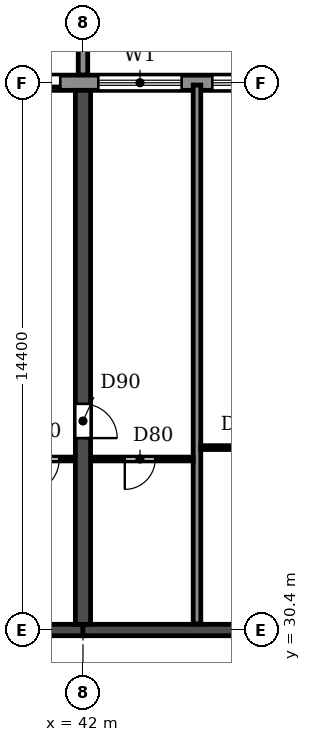
"""IFC4 building model, lengths in metres.
Left out: names, types, materials, properties, quantities, classifications, styles, units other than length and angle.
Written with IfcOpenShell. Run it as: python <this file> out.ifc"""

import sys

from ifc_helpers import new_model, si_unit, direction, frame, frame_2d, origin, place, context, subcontext, project, spatial, polyline, rectangle, outline, extrude, source, transform, mapped, element, fill, save


model = new_model("IFC4")
c1 = context("Model", 3, precision=1e-05, world=origin(), true_north=direction((0.0, 1.0)))
c2 = subcontext(c1, "Body", "Model", "MODEL_VIEW")
j1 = project(units=[si_unit("LENGTHUNIT", "METRE"), si_unit("PLANEANGLEUNIT", "RADIAN")], contexts=[c1])
p1 = place(None, origin())
s1 = spatial("IfcSite", under=j1, at=p1, CompositionType="ELEMENT")
p2 = place(p1, origin())
s2 = spatial("IfcBuilding", under=s1, at=p2, CompositionType="ELEMENT")
p3 = place(p2, frame((0.0, 0.0, 33.3)))
s3 = spatial("IfcBuildingStorey", under=s2, at=p3, CompositionType="ELEMENT", Elevation=33.3)
p4 = place(p3, frame((42.0, 30.55, 0.0), z_axis=(0.0, 0.0, 1.0), x_axis=(0.0, 1.0, 0.0)))
e1 = element("IfcWall", 1, at=p4, inside=s3, PredefinedType="SHEAR", context=c2, shape_type="SweptSolid", body=[
    extrude(rectangle(XDim=14.05, YDim=0.4, at=frame_2d((7.025, 0.0))), origin(), (0.0, 0.0, 1.0), 3.05),
])
p5 = place(p4, frame((4.9, 0.0, 0.0)))
e2 = element("IfcOpeningElement", 2, at=p5, cuts=e1, PredefinedType="OPENING", context=c2, shape_type="SweptSolid", body=[
    extrude(rectangle(XDim=0.9, YDim=2.1, at=frame_2d((0.45, 1.05))), frame((0.0, 0.21, 0.0), z_axis=(0.0, -1.0, 0.0), x_axis=(1.0, 0.0, 0.0)), (0.0, 0.0, 1.0), 0.42),
])
p6 = place(p3, frame((36.0, 30.4, 0.0), z_axis=(0.0, 0.0, 1.0), x_axis=(1.0, 0.0, 0.0)))
e3 = element("IfcWall", 3, at=p6, inside=s3, PredefinedType="SHEAR", context=c2, shape_type="SweptSolid", body=[
    extrude(rectangle(XDim=6.0, YDim=0.3, at=frame_2d((3.0, 0.0))), origin(), (0.0, 0.0, 1.0), 2.45),
])
p7 = place(p6, frame((2.45, 0.0, 0.0)))
e4 = element("IfcOpeningElement", 4, at=p7, cuts=e3, PredefinedType="OPENING", context=c2, shape_type="SweptSolid", body=[
    extrude(rectangle(XDim=1.0, YDim=2.1, at=frame_2d((0.5, 1.05))), frame((0.0, 0.16, 0.0), z_axis=(0.0, -1.0, 0.0), x_axis=(1.0, 0.0, 0.0)), (0.0, 0.0, 1.0), 0.32),
])
p8 = place(p3, frame((42.0, 30.4, 0.0), z_axis=(0.0, 0.0, 1.0), x_axis=(1.0, 0.0, 0.0)))
e5 = element("IfcWall", 5, at=p8, inside=s3, PredefinedType="SHEAR", context=c2, shape_type="SweptSolid", body=[
    extrude(rectangle(XDim=6.0, YDim=0.3, at=frame_2d((3.0, 0.0))), origin(), (0.0, 0.0, 1.0), 2.45),
])
p9 = place(p3, frame((97.317, 44.8, 0.0), z_axis=(0.0, 0.0, 1.0), x_axis=(-1.0, 0.0, 0.0)))
e6 = element("IfcWall", 6, at=p9, inside=s3, PredefinedType="STANDARD", context=c2, shape_type="SweptSolid", body=[
    extrude(rectangle(XDim=92.634, YDim=0.4, at=frame_2d((46.317, 0.0))), origin(), (0.0, 0.0, 1.0), 3.05),
])
p10 = place(p9, frame((88.717, 0.0, 0.9)))
e7 = element("IfcOpeningElement", 7, at=p10, cuts=e6, PredefinedType="OPENING", context=c2, shape_type="SweptSolid", body=[
    extrude(rectangle(XDim=2.2, YDim=1.5, at=frame_2d((1.1, 0.75))), frame((0.0, 0.21, 0.0), z_axis=(0.0, -1.0, 0.0), x_axis=(1.0, 0.0, 0.0)), (0.0, 0.0, 1.0), 0.42),
])
p11 = place(p9, frame((85.917, 0.0, 0.0)))
e8 = element("IfcOpeningElement", 8, at=p11, cuts=e6, PredefinedType="OPENING", context=c2, shape_type="SweptSolid", body=[
    extrude(rectangle(XDim=1.8, YDim=2.4, at=frame_2d((0.9, 1.2))), frame((0.0, 0.21, 0.0), z_axis=(0.0, -1.0, 0.0), x_axis=(1.0, 0.0, 0.0)), (0.0, 0.0, 1.0), 0.42),
])
p12 = place(p9, frame((82.717, 0.0, 0.9)))
e9 = element("IfcOpeningElement", 9, at=p12, cuts=e6, PredefinedType="OPENING", context=c2, shape_type="SweptSolid", body=[
    extrude(rectangle(XDim=2.2, YDim=1.5, at=frame_2d((1.1, 0.75))), frame((0.0, 0.21, 0.0), z_axis=(0.0, -1.0, 0.0), x_axis=(1.0, 0.0, 0.0)), (0.0, 0.0, 1.0), 0.42),
])
p13 = place(p9, frame((79.917, 0.0, 0.0)))
e10 = element("IfcOpeningElement", 10, at=p13, cuts=e6, PredefinedType="OPENING", context=c2, shape_type="SweptSolid", body=[
    extrude(rectangle(XDim=1.8, YDim=2.4, at=frame_2d((0.9, 1.2))), frame((0.0, 0.21, 0.0), z_axis=(0.0, -1.0, 0.0), x_axis=(1.0, 0.0, 0.0)), (0.0, 0.0, 1.0), 0.42),
])
p14 = place(p9, frame((76.717, 0.0, 0.9)))
e11 = element("IfcOpeningElement", 11, at=p14, cuts=e6, PredefinedType="OPENING", context=c2, shape_type="SweptSolid", body=[
    extrude(rectangle(XDim=2.2, YDim=1.5, at=frame_2d((1.1, 0.75))), frame((0.0, 0.21, 0.0), z_axis=(0.0, -1.0, 0.0), x_axis=(1.0, 0.0, 0.0)), (0.0, 0.0, 1.0), 0.42),
])
p15 = place(p9, frame((73.717, 0.0, 0.9)))
e12 = element("IfcOpeningElement", 12, at=p15, cuts=e6, PredefinedType="OPENING", context=c2, shape_type="SweptSolid", body=[
    extrude(rectangle(XDim=2.2, YDim=1.5, at=frame_2d((1.1, 0.75))), frame((0.0, 0.21, 0.0), z_axis=(0.0, -1.0, 0.0), x_axis=(1.0, 0.0, 0.0)), (0.0, 0.0, 1.0), 0.42),
])
p16 = place(p9, frame((70.717, 0.0, 0.9)))
e13 = element("IfcOpeningElement", 13, at=p16, cuts=e6, PredefinedType="OPENING", context=c2, shape_type="SweptSolid", body=[
    extrude(rectangle(XDim=2.2, YDim=1.5, at=frame_2d((1.1, 0.75))), frame((0.0, 0.21, 0.0), z_axis=(0.0, -1.0, 0.0), x_axis=(1.0, 0.0, 0.0)), (0.0, 0.0, 1.0), 0.42),
])
p17 = place(p9, frame((67.917, 0.0, 0.0)))
e14 = element("IfcOpeningElement", 14, at=p17, cuts=e6, PredefinedType="OPENING", context=c2, shape_type="SweptSolid", body=[
    extrude(rectangle(XDim=1.8, YDim=2.4, at=frame_2d((0.9, 1.2))), frame((0.0, 0.21, 0.0), z_axis=(0.0, -1.0, 0.0), x_axis=(1.0, 0.0, 0.0)), (0.0, 0.0, 1.0), 0.42),
])
p18 = place(p9, frame((64.717, 0.0, 0.9)))
e15 = element("IfcOpeningElement", 15, at=p18, cuts=e6, PredefinedType="OPENING", context=c2, shape_type="SweptSolid", body=[
    extrude(rectangle(XDim=2.2, YDim=1.5, at=frame_2d((1.1, 0.75))), frame((0.0, 0.21, 0.0), z_axis=(0.0, -1.0, 0.0), x_axis=(1.0, 0.0, 0.0)), (0.0, 0.0, 1.0), 0.42),
])
p19 = place(p9, frame((61.717, 0.0, 0.9)))
e16 = element("IfcOpeningElement", 16, at=p19, cuts=e6, PredefinedType="OPENING", context=c2, shape_type="SweptSolid", body=[
    extrude(rectangle(XDim=2.2, YDim=1.5, at=frame_2d((1.1, 0.75))), frame((0.0, 0.21, 0.0), z_axis=(0.0, -1.0, 0.0), x_axis=(1.0, 0.0, 0.0)), (0.0, 0.0, 1.0), 0.42),
])
p20 = place(p9, frame((58.717, 0.0, 0.9)))
e17 = element("IfcOpeningElement", 17, at=p20, cuts=e6, PredefinedType="OPENING", context=c2, shape_type="SweptSolid", body=[
    extrude(rectangle(XDim=2.2, YDim=1.5, at=frame_2d((1.1, 0.75))), frame((0.0, 0.21, 0.0), z_axis=(0.0, -1.0, 0.0), x_axis=(1.0, 0.0, 0.0)), (0.0, 0.0, 1.0), 0.42),
])
p21 = place(p9, frame((55.917, 0.0, 0.0)))
e18 = element("IfcOpeningElement", 18, at=p21, cuts=e6, PredefinedType="OPENING", context=c2, shape_type="SweptSolid", body=[
    extrude(rectangle(XDim=1.8, YDim=2.4, at=frame_2d((0.9, 1.2))), frame((0.0, 0.21, 0.0), z_axis=(0.0, -1.0, 0.0), x_axis=(1.0, 0.0, 0.0)), (0.0, 0.0, 1.0), 0.42),
])
p22 = place(p9, frame((52.717, 0.0, 0.9)))
e19 = element("IfcOpeningElement", 19, at=p22, cuts=e6, PredefinedType="OPENING", context=c2, shape_type="SweptSolid", body=[
    extrude(rectangle(XDim=2.2, YDim=1.5, at=frame_2d((1.1, 0.75))), frame((0.0, 0.21, 0.0), z_axis=(0.0, -1.0, 0.0), x_axis=(1.0, 0.0, 0.0)), (0.0, 0.0, 1.0), 0.42),
])
p23 = place(p9, frame((49.717, 0.0, 0.9)))
e20 = element("IfcOpeningElement", 20, at=p23, cuts=e6, PredefinedType="OPENING", context=c2, shape_type="SweptSolid", body=[
    extrude(rectangle(XDim=2.2, YDim=1.5, at=frame_2d((1.1, 0.75))), frame((0.0, 0.21, 0.0), z_axis=(0.0, -1.0, 0.0), x_axis=(1.0, 0.0, 0.0)), (0.0, 0.0, 1.0), 0.42),
])
p24 = place(p9, frame((46.717, 0.0, 0.9)))
e21 = element("IfcOpeningElement", 21, at=p24, cuts=e6, PredefinedType="OPENING", context=c2, shape_type="SweptSolid", body=[
    extrude(rectangle(XDim=2.2, YDim=1.5, at=frame_2d((1.1, 0.75))), frame((0.0, 0.21, 0.0), z_axis=(0.0, -1.0, 0.0), x_axis=(1.0, 0.0, 0.0)), (0.0, 0.0, 1.0), 0.42),
])
p25 = place(p9, frame((43.917, 0.0, 0.0)))
e22 = element("IfcOpeningElement", 22, at=p25, cuts=e6, PredefinedType="OPENING", context=c2, shape_type="SweptSolid", body=[
    extrude(rectangle(XDim=1.8, YDim=2.4, at=frame_2d((0.9, 1.2))), frame((0.0, 0.21, 0.0), z_axis=(0.0, -1.0, 0.0), x_axis=(1.0, 0.0, 0.0)), (0.0, 0.0, 1.0), 0.42),
])
p26 = place(p9, frame((40.717, 0.0, 0.9)))
e23 = element("IfcOpeningElement", 23, at=p26, cuts=e6, PredefinedType="OPENING", context=c2, shape_type="SweptSolid", body=[
    extrude(rectangle(XDim=2.2, YDim=1.5, at=frame_2d((1.1, 0.75))), frame((0.0, 0.21, 0.0), z_axis=(0.0, -1.0, 0.0), x_axis=(1.0, 0.0, 0.0)), (0.0, 0.0, 1.0), 0.42),
])
p27 = place(p9, frame((37.717, 0.0, 0.9)))
e24 = element("IfcOpeningElement", 24, at=p27, cuts=e6, PredefinedType="OPENING", context=c2, shape_type="SweptSolid", body=[
    extrude(rectangle(XDim=2.2, YDim=1.5, at=frame_2d((1.1, 0.75))), frame((0.0, 0.21, 0.0), z_axis=(0.0, -1.0, 0.0), x_axis=(1.0, 0.0, 0.0)), (0.0, 0.0, 1.0), 0.42),
])
p28 = place(p9, frame((34.717, 0.0, 0.9)))
e25 = element("IfcOpeningElement", 25, at=p28, cuts=e6, PredefinedType="OPENING", context=c2, shape_type="SweptSolid", body=[
    extrude(rectangle(XDim=2.2, YDim=1.5, at=frame_2d((1.1, 0.75))), frame((0.0, 0.21, 0.0), z_axis=(0.0, -1.0, 0.0), x_axis=(1.0, 0.0, 0.0)), (0.0, 0.0, 1.0), 0.42),
])
p29 = place(p9, frame((31.917, 0.0, 0.0)))
e26 = element("IfcOpeningElement", 26, at=p29, cuts=e6, PredefinedType="OPENING", context=c2, shape_type="SweptSolid", body=[
    extrude(rectangle(XDim=1.8, YDim=2.4, at=frame_2d((0.9, 1.2))), frame((0.0, 0.21, 0.0), z_axis=(0.0, -1.0, 0.0), x_axis=(1.0, 0.0, 0.0)), (0.0, 0.0, 1.0), 0.42),
])
p30 = place(p9, frame((28.717, 0.0, 0.9)))
e27 = element("IfcOpeningElement", 27, at=p30, cuts=e6, PredefinedType="OPENING", context=c2, shape_type="SweptSolid", body=[
    extrude(rectangle(XDim=2.2, YDim=1.5, at=frame_2d((1.1, 0.75))), frame((0.0, 0.21, 0.0), z_axis=(0.0, -1.0, 0.0), x_axis=(1.0, 0.0, 0.0)), (0.0, 0.0, 1.0), 0.42),
])
p31 = place(p9, frame((25.717, 0.0, 0.9)))
e28 = element("IfcOpeningElement", 28, at=p31, cuts=e6, PredefinedType="OPENING", context=c2, shape_type="SweptSolid", body=[
    extrude(rectangle(XDim=2.2, YDim=1.5, at=frame_2d((1.1, 0.75))), frame((0.0, 0.21, 0.0), z_axis=(0.0, -1.0, 0.0), x_axis=(1.0, 0.0, 0.0)), (0.0, 0.0, 1.0), 0.42),
])
p32 = place(p9, frame((22.917, 0.0, 0.0)))
e29 = element("IfcOpeningElement", 29, at=p32, cuts=e6, PredefinedType="OPENING", context=c2, shape_type="SweptSolid", body=[
    extrude(rectangle(XDim=1.8, YDim=2.4, at=frame_2d((0.9, 1.2))), frame((0.0, 0.21, 0.0), z_axis=(0.0, -1.0, 0.0), x_axis=(1.0, 0.0, 0.0)), (0.0, 0.0, 1.0), 0.42),
])
p33 = place(p9, frame((19.717, 0.0, 0.9)))
e30 = element("IfcOpeningElement", 30, at=p33, cuts=e6, PredefinedType="OPENING", context=c2, shape_type="SweptSolid", body=[
    extrude(rectangle(XDim=2.2, YDim=1.5, at=frame_2d((1.1, 0.75))), frame((0.0, 0.21, 0.0), z_axis=(0.0, -1.0, 0.0), x_axis=(1.0, 0.0, 0.0)), (0.0, 0.0, 1.0), 0.42),
])
p34 = place(p9, frame((16.717, 0.0, 0.9)))
e31 = element("IfcOpeningElement", 31, at=p34, cuts=e6, PredefinedType="OPENING", context=c2, shape_type="SweptSolid", body=[
    extrude(rectangle(XDim=2.2, YDim=1.5, at=frame_2d((1.1, 0.75))), frame((0.0, 0.21, 0.0), z_axis=(0.0, -1.0, 0.0), x_axis=(1.0, 0.0, 0.0)), (0.0, 0.0, 1.0), 0.42),
])
p35 = place(p9, frame((13.917, 0.0, 0.0)))
e32 = element("IfcOpeningElement", 32, at=p35, cuts=e6, PredefinedType="OPENING", context=c2, shape_type="SweptSolid", body=[
    extrude(rectangle(XDim=1.8, YDim=2.4, at=frame_2d((0.9, 1.2))), frame((0.0, 0.21, 0.0), z_axis=(0.0, -1.0, 0.0), x_axis=(1.0, 0.0, 0.0)), (0.0, 0.0, 1.0), 0.42),
])
p36 = place(p9, frame((10.717, 0.0, 0.9)))
e33 = element("IfcOpeningElement", 33, at=p36, cuts=e6, PredefinedType="OPENING", context=c2, shape_type="SweptSolid", body=[
    extrude(rectangle(XDim=2.2, YDim=1.5, at=frame_2d((1.1, 0.75))), frame((0.0, 0.21, 0.0), z_axis=(0.0, -1.0, 0.0), x_axis=(1.0, 0.0, 0.0)), (0.0, 0.0, 1.0), 0.42),
])
p37 = place(p9, frame((7.917, 0.0, 0.0)))
e34 = element("IfcOpeningElement", 34, at=p37, cuts=e6, PredefinedType="OPENING", context=c2, shape_type="SweptSolid", body=[
    extrude(rectangle(XDim=1.8, YDim=2.4, at=frame_2d((0.9, 1.2))), frame((0.0, 0.21, 0.0), z_axis=(0.0, -1.0, 0.0), x_axis=(1.0, 0.0, 0.0)), (0.0, 0.0, 1.0), 0.42),
])
p38 = place(p9, frame((4.717, 0.0, 0.9)))
e35 = element("IfcOpeningElement", 35, at=p38, cuts=e6, PredefinedType="OPENING", context=c2, shape_type="SweptSolid", body=[
    extrude(rectangle(XDim=2.2, YDim=1.5, at=frame_2d((1.1, 0.75))), frame((0.0, 0.21, 0.0), z_axis=(0.0, -1.0, 0.0), x_axis=(1.0, 0.0, 0.0)), (0.0, 0.0, 1.0), 0.42),
])
p39 = place(p9, frame((1.917, 0.0, 0.0)))
e36 = element("IfcOpeningElement", 36, at=p39, cuts=e6, PredefinedType="OPENING", context=c2, shape_type="SweptSolid", body=[
    extrude(rectangle(XDim=1.8, YDim=2.4, at=frame_2d((0.9, 1.2))), frame((0.0, 0.21, 0.0), z_axis=(0.0, -1.0, 0.0), x_axis=(1.0, 0.0, 0.0)), (0.0, 0.0, 1.0), 0.42),
])
m1 = source(origin(), c2, "Body", "SweptSolid", [
    extrude(outline(polyline([(0.0, 0.0), (0.25, 0.0), (0.25, 3.1), (0.0, 3.1), (0.0, 0.0)])), origin(), (0.0, 0.0, 1.0), 3.1),
])
p40 = place(p3, frame((41.875, 45.0, 0.0)))
e37 = element("IfcWall", 37, at=p40, inside=s3, PredefinedType="STANDARD", context=c2, shape_type="MappedRepresentation", body=[
    mapped(m1, transform((0.0, 0.0, 0.0))),
])
p41 = place(p3, frame((45.0, 30.56, 0.0), z_axis=(0.0, 0.0, 1.0), x_axis=(0.0, 1.0, 0.0)))
e38 = element("IfcWall", 38, at=p41, inside=s3, PredefinedType="PARTITIONING", context=c2, shape_type="SweptSolid", body=[
    extrude(rectangle(XDim=14.18, YDim=0.2, at=frame_2d((7.09, 0.0))), origin(), (0.0, 0.0, 1.0), 3.05),
])
p42 = place(p3, frame((39.8, 34.9, 0.0), z_axis=(0.0, 0.0, 1.0), x_axis=(1.0, 0.0, 0.0)))
e39 = element("IfcWall", 39, at=p42, inside=s3, PredefinedType="PARTITIONING", context=c2, shape_type="SweptSolid", body=[
    extrude(rectangle(XDim=1.99, YDim=0.1, at=frame_2d((0.995, 0.0))), origin(), (0.0, 0.0, 1.0), 3.05),
])
p43 = place(p42, frame((0.675, 0.0, 0.0)))
e40 = element("IfcOpeningElement", 40, at=p43, cuts=e39, PredefinedType="OPENING", context=c2, shape_type="SweptSolid", body=[
    extrude(rectangle(XDim=0.9, YDim=2.1, at=frame_2d((0.45, 1.05))), frame((0.0, 0.06, 0.0), z_axis=(0.0, -1.0, 0.0), x_axis=(1.0, 0.0, 0.0)), (0.0, 0.0, 1.0), 0.12),
])
p44 = place(p3, frame((42.21, 34.9, 0.0), z_axis=(0.0, 0.0, 1.0), x_axis=(1.0, 0.0, 0.0)))
e41 = element("IfcWall", 41, at=p44, inside=s3, PredefinedType="PARTITIONING", context=c2, shape_type="SweptSolid", body=[
    extrude(rectangle(XDim=2.69, YDim=0.1, at=frame_2d((1.345, 0.0))), origin(), (0.0, 0.0, 1.0), 3.05),
])
p45 = place(p44, frame((0.89, 0.0, 0.0)))
e42 = element("IfcOpeningElement", 42, at=p45, cuts=e41, PredefinedType="OPENING", context=c2, shape_type="SweptSolid", body=[
    extrude(rectangle(XDim=0.8, YDim=2.1, at=frame_2d((0.4, 1.05))), frame((0.0, 0.06, 0.0), z_axis=(0.0, -1.0, 0.0), x_axis=(1.0, 0.0, 0.0)), (0.0, 0.0, 1.0), 0.12),
])
p46 = place(p3, frame((45.1, 35.2, 0.0), z_axis=(0.0, 0.0, 1.0), x_axis=(1.0, 0.0, 0.0)))
e43 = element("IfcWall", 43, at=p46, inside=s3, PredefinedType="PARTITIONING", context=c2, shape_type="SweptSolid", body=[
    extrude(rectangle(XDim=2.69, YDim=0.1, at=frame_2d((1.345, 0.0))), origin(), (0.0, 0.0, 1.0), 3.05),
])
p47 = place(p46, frame((1.0, 0.0, 0.0)))
e44 = element("IfcOpeningElement", 44, at=p47, cuts=e43, PredefinedType="OPENING", context=c2, shape_type="SweptSolid", body=[
    extrude(rectangle(XDim=0.8, YDim=2.1, at=frame_2d((0.4, 1.05))), frame((0.0, 0.06, 0.0), z_axis=(0.0, -1.0, 0.0), x_axis=(1.0, 0.0, 0.0)), (0.0, 0.0, 1.0), 0.12),
])
p48 = place(p21, origin())
e45 = element("IfcDoor", 45, at=p48, inside=s3, OperationType="DOUBLE_DOOR_SLIDING", PredefinedType="DOOR", context=c2, shape_type="SweptSolid", body=[
    extrude(rectangle(XDim=1.8, YDim=2.4, at=frame_2d((0.9, 1.2))), frame((0.0, 0.025, 0.0), z_axis=(0.0, -1.0, 0.0), x_axis=(1.0, 0.0, 0.0)), (0.0, 0.0, 1.0), 0.05),
])
fill(e18, e45)
p49 = place(p22, origin())
e46 = element("IfcWindow", 46, at=p49, inside=s3, PartitioningType="DOUBLE_PANEL_HORIZONTAL", PredefinedType="WINDOW", context=c2, shape_type="SweptSolid", body=[
    extrude(rectangle(XDim=2.2, YDim=1.5, at=frame_2d((1.1, 0.75))), frame((0.0, 0.03, 0.0), z_axis=(0.0, -1.0, 0.0), x_axis=(1.0, 0.0, 0.0)), (0.0, 0.0, 1.0), 0.06),
])
fill(e19, e46)
p50 = place(p23, origin())
e47 = element("IfcWindow", 47, at=p50, inside=s3, PartitioningType="DOUBLE_PANEL_HORIZONTAL", PredefinedType="WINDOW", context=c2, shape_type="SweptSolid", body=[
    extrude(rectangle(XDim=2.2, YDim=1.5, at=frame_2d((1.1, 0.75))), frame((0.0, 0.03, 0.0), z_axis=(0.0, -1.0, 0.0), x_axis=(1.0, 0.0, 0.0)), (0.0, 0.0, 1.0), 0.06),
])
fill(e20, e47)
p51 = place(p45, frame((0.8, 0.0, 0.0), z_axis=(0.0, 0.0, 1.0), x_axis=(-1.0, 0.0, 0.0)))
e48 = element("IfcDoor", 48, at=p51, inside=s3, OperationType="SINGLE_SWING_RIGHT", PredefinedType="DOOR", context=c2, shape_type="SweptSolid", body=[
    extrude(rectangle(XDim=0.8, YDim=2.1, at=frame_2d((0.4, 1.05))), frame((0.0, 0.025, 0.0), z_axis=(0.0, -1.0, 0.0), x_axis=(1.0, 0.0, 0.0)), (0.0, 0.0, 1.0), 0.05),
])
fill(e42, e48)
p52 = place(p43, frame((0.9, 0.0, 0.0), z_axis=(0.0, 0.0, 1.0), x_axis=(-1.0, 0.0, 0.0)))
e49 = element("IfcDoor", 49, at=p52, inside=s3, OperationType="SINGLE_SWING_RIGHT", PredefinedType="DOOR", context=c2, shape_type="SweptSolid", body=[
    extrude(rectangle(XDim=0.9, YDim=2.1, at=frame_2d((0.45, 1.05))), frame((0.0, 0.025, 0.0), z_axis=(0.0, -1.0, 0.0), x_axis=(1.0, 0.0, 0.0)), (0.0, 0.0, 1.0), 0.05),
])
fill(e40, e49)
p53 = place(p5, frame((0.9, 0.0, 0.0), z_axis=(0.0, 0.0, 1.0), x_axis=(-1.0, 0.0, 0.0)))
e50 = element("IfcDoor", 50, at=p53, inside=s3, OperationType="SINGLE_SWING_RIGHT", PredefinedType="DOOR", context=c2, shape_type="SweptSolid", body=[
    extrude(rectangle(XDim=0.9, YDim=2.1, at=frame_2d((0.45, 1.05))), frame((0.0, 0.025, 0.0), z_axis=(0.0, -1.0, 0.0), x_axis=(1.0, 0.0, 0.0)), (0.0, 0.0, 1.0), 0.05),
])
fill(e2, e50)
save(model, sys.argv[1])
